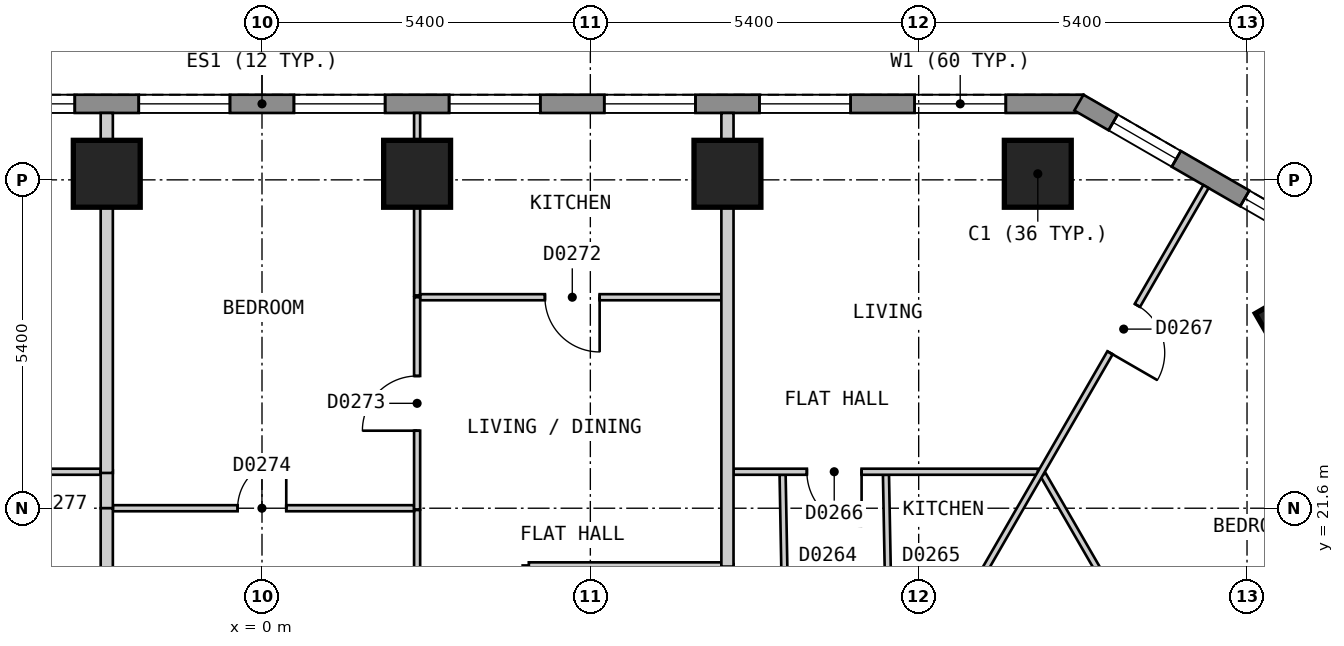
"""IFC4 building model, lengths in metres.
Left out: names, types, materials, properties, quantities, classifications, styles, units other than length and angle.
Written with IfcOpenShell. Run it as: python <this file> out.ifc"""

import sys

from ifc_helpers import new_model, si_unit, direction, frame, frame_2d, origin, origin_2d, place, context, subcontext, project, spatial, polyline, rectangle, outline, extrude, element, fill, save


model = new_model("IFC4")
c1 = context("Model", 3, precision=1e-05, world=origin(), true_north=direction((0.0, 1.0)))
c2 = subcontext(c1, "Body", "Model", "MODEL_VIEW")
j1 = project(units=[si_unit("LENGTHUNIT", "METRE"), si_unit("PLANEANGLEUNIT", "RADIAN")], contexts=[c1])
p1 = place(None, origin())
s1 = spatial("IfcSite", under=j1, at=p1, CompositionType="ELEMENT")
p2 = place(p1, origin())
s2 = spatial("IfcBuilding", under=s1, at=p2, CompositionType="ELEMENT")
p3 = place(p2, frame((0.0, 0.0, 47.4)))
s3 = spatial("IfcBuildingStorey", under=s2, at=p3, CompositionType="ELEMENT", Elevation=47.4)
for number, where, z_axis, x_axis in (
    (1, (12.759, 27.1, 0.0), (0.0, 0.0, 1.0), (-1.0, 0.0, 0.0)),
    (2, (7.655, 27.1, 0.0), (0.0, 0.0, 1.0), (-1.0, 0.0, 0.0)),
    (3, (2.551, 27.1, 0.0), (0.0, 0.0, 1.0), (-1.0, 0.0, 0.0)),
    (4, (-2.553, 27.1, 0.0), (0.0, 0.0, 1.0), (-1.0, 0.0, 0.0)),
    (5, (17.089, 24.601, 0.0), (0.0, 0.0, 1.0), (-0.5, 0.866, 0.0)),
):
    element("IfcColumn", number, at=place(p3, frame(where, z_axis=z_axis, x_axis=x_axis)), inside=s3, PredefinedType="COLUMN", context=c2, shape_type="SweptSolid", body=[
        extrude(rectangle(XDim=1.1, YDim=1.1, at=origin_2d()), origin(), (0.0, 0.0, 1.0), 3.0),
    ])
p4 = place(p3, frame((13.51, 28.25, 0.0), z_axis=(0.0, 0.0, 1.0), x_axis=(-1.0, 0.0, 0.0)))
e6 = element("IfcWall", 6, at=p4, inside=s3, PredefinedType="SOLIDWALL", context=c2, shape_type="SweptSolid", body=[
    extrude(outline(polyline([(0.0, -0.15), (27.02, -0.15), (26.94, 0.15), (0.08, 0.15), (0.0, -0.15)])), origin(), (0.0, 0.0, 1.0), 2.7),
])
p5 = place(p4, frame((1.277, 0.0, 0.15)))
e7 = element("IfcOpeningElement", 7, at=p5, cuts=e6, PredefinedType="OPENING", context=c2, shape_type="SweptSolid", body=[
    extrude(rectangle(XDim=1.5, YDim=2.1, at=frame_2d((0.75, 1.05))), frame((0.0, 0.16, 0.0), z_axis=(0.0, -1.0, 0.0), x_axis=(1.0, 0.0, 0.0)), (0.0, 0.0, 1.0), 0.32),
])
p6 = place(p4, frame((3.829, 0.0, 0.15)))
e8 = element("IfcOpeningElement", 8, at=p6, cuts=e6, PredefinedType="OPENING", context=c2, shape_type="SweptSolid", body=[
    extrude(rectangle(XDim=1.5, YDim=2.1, at=frame_2d((0.75, 1.05))), frame((0.0, 0.16, 0.0), z_axis=(0.0, -1.0, 0.0), x_axis=(1.0, 0.0, 0.0)), (0.0, 0.0, 1.0), 0.32),
])
p7 = place(p4, frame((6.381, 0.0, 0.15)))
e9 = element("IfcOpeningElement", 9, at=p7, cuts=e6, PredefinedType="OPENING", context=c2, shape_type="SweptSolid", body=[
    extrude(rectangle(XDim=1.5, YDim=2.1, at=frame_2d((0.75, 1.05))), frame((0.0, 0.16, 0.0), z_axis=(0.0, -1.0, 0.0), x_axis=(1.0, 0.0, 0.0)), (0.0, 0.0, 1.0), 0.32),
])
p8 = place(p4, frame((8.933, 0.0, 0.15)))
e10 = element("IfcOpeningElement", 10, at=p8, cuts=e6, PredefinedType="OPENING", context=c2, shape_type="SweptSolid", body=[
    extrude(rectangle(XDim=1.5, YDim=2.1, at=frame_2d((0.75, 1.05))), frame((0.0, 0.16, 0.0), z_axis=(0.0, -1.0, 0.0), x_axis=(1.0, 0.0, 0.0)), (0.0, 0.0, 1.0), 0.32),
])
p9 = place(p4, frame((11.485, 0.0, 0.15)))
e11 = element("IfcOpeningElement", 11, at=p9, cuts=e6, PredefinedType="OPENING", context=c2, shape_type="SweptSolid", body=[
    extrude(rectangle(XDim=1.5, YDim=2.1, at=frame_2d((0.75, 1.05))), frame((0.0, 0.16, 0.0), z_axis=(0.0, -1.0, 0.0), x_axis=(1.0, 0.0, 0.0)), (0.0, 0.0, 1.0), 0.32),
])
p10 = place(p4, frame((14.037, 0.0, 0.15)))
e12 = element("IfcOpeningElement", 12, at=p10, cuts=e6, PredefinedType="OPENING", context=c2, shape_type="SweptSolid", body=[
    extrude(rectangle(XDim=1.5, YDim=2.1, at=frame_2d((0.75, 1.05))), frame((0.0, 0.16, 0.0), z_axis=(0.0, -1.0, 0.0), x_axis=(1.0, 0.0, 0.0)), (0.0, 0.0, 1.0), 0.32),
])
p11 = place(p4, frame((16.589, 0.0, 0.15)))
e13 = element("IfcOpeningElement", 13, at=p11, cuts=e6, PredefinedType="OPENING", context=c2, shape_type="SweptSolid", body=[
    extrude(rectangle(XDim=1.5, YDim=2.1, at=frame_2d((0.75, 1.05))), frame((0.0, 0.16, 0.0), z_axis=(0.0, -1.0, 0.0), x_axis=(1.0, 0.0, 0.0)), (0.0, 0.0, 1.0), 0.32),
])
p12 = place(p4, frame((19.141, 0.0, 0.15)))
e14 = element("IfcOpeningElement", 14, at=p12, cuts=e6, PredefinedType="OPENING", context=c2, shape_type="SweptSolid", body=[
    extrude(rectangle(XDim=1.5, YDim=2.1, at=frame_2d((0.75, 1.05))), frame((0.0, 0.16, 0.0), z_axis=(0.0, -1.0, 0.0), x_axis=(1.0, 0.0, 0.0)), (0.0, 0.0, 1.0), 0.32),
])
p13 = place(p4, frame((21.693, 0.0, 0.15)))
e15 = element("IfcOpeningElement", 15, at=p13, cuts=e6, PredefinedType="OPENING", context=c2, shape_type="SweptSolid", body=[
    extrude(rectangle(XDim=1.5, YDim=2.1, at=frame_2d((0.75, 1.05))), frame((0.0, 0.16, 0.0), z_axis=(0.0, -1.0, 0.0), x_axis=(1.0, 0.0, 0.0)), (0.0, 0.0, 1.0), 0.32),
])
p14 = place(p4, frame((24.245, 0.0, 0.15)))
e16 = element("IfcOpeningElement", 16, at=p14, cuts=e6, PredefinedType="OPENING", context=c2, shape_type="SweptSolid", body=[
    extrude(rectangle(XDim=1.5, YDim=2.1, at=frame_2d((0.75, 1.05))), frame((0.0, 0.16, 0.0), z_axis=(0.0, -1.0, 0.0), x_axis=(1.0, 0.0, 0.0)), (0.0, 0.0, 1.0), 0.32),
])
p15 = place(p3, frame((17.765, 25.77, 0.0), z_axis=(0.0, 0.0, 1.0), x_axis=(-0.866010750942, 0.50002537861, 0.0)))
e17 = element("IfcWall", 17, at=p15, inside=s3, PredefinedType="SOLIDWALL", context=c2, shape_type="SweptSolid", body=[
    extrude(outline(polyline([(0.0, -0.15), (5.0, -0.15), (4.919, 0.15), (0.08, 0.15), (0.0, -0.15)])), origin(), (0.0, 0.0, 1.0), 2.7),
])
p16 = place(p15, frame((0.65, 0.0, 0.15)))
e18 = element("IfcOpeningElement", 18, at=p16, cuts=e17, PredefinedType="OPENING", context=c2, shape_type="SweptSolid", body=[
    extrude(rectangle(XDim=1.2, YDim=2.1, at=frame_2d((0.6, 1.05))), frame((0.0, 0.16, 0.0), z_axis=(0.0, -1.0, 0.0), x_axis=(1.0, 0.0, 0.0)), (0.0, 0.0, 1.0), 0.32),
])
p17 = place(p15, frame((3.15, 0.0, 0.15)))
e19 = element("IfcOpeningElement", 19, at=p17, cuts=e17, PredefinedType="OPENING", context=c2, shape_type="SweptSolid", body=[
    extrude(rectangle(XDim=1.2, YDim=2.1, at=frame_2d((0.6, 1.05))), frame((0.0, 0.16, 0.0), z_axis=(0.0, -1.0, 0.0), x_axis=(1.0, 0.0, 0.0)), (0.0, 0.0, 1.0), 0.32),
])
p18 = place(p3, frame((12.846, 22.15, 0.0), z_axis=(0.0, 0.0, 1.0), x_axis=(0.500002715276, -0.866023836113, 0.0)))
e20 = element("IfcWall", 20, at=p18, inside=s3, PredefinedType="PARTITIONING", context=c2, shape_type="SweptSolid", body=[
    extrude(rectangle(XDim=5.002, YDim=0.1, at=frame_2d((2.501, 0.0))), origin(), (0.0, 0.0, 1.0), 2.7),
])
p19 = place(p18, frame((2.122, 0.0, 0.0)))
e21 = element("IfcOpeningElement", 21, at=p19, cuts=e20, PredefinedType="OPENING", context=c2, shape_type="SweptSolid", body=[
    extrude(rectangle(XDim=0.8, YDim=2.1, at=frame_2d((0.4, 1.05))), frame((0.0, 0.06, 0.0), z_axis=(0.0, -1.0, 0.0), x_axis=(1.0, 0.0, 0.0)), (0.0, 0.0, 1.0), 0.12),
])
p20 = place(p3, frame((8.562, 22.15, 0.0), z_axis=(0.0, 0.0, 1.0), x_axis=(0.018504185939, -0.999828782894, 0.0)))
e22 = element("IfcWall", 22, at=p20, inside=s3, PredefinedType="PARTITIONING", context=c2, shape_type="SweptSolid", body=[
    extrude(rectangle(XDim=4.051, YDim=0.1, at=frame_2d((2.025, 0.0))), origin(), (0.0, 0.0, 1.0), 2.7),
])
p21 = place(p20, frame((1.65, 0.0, 0.0)))
e23 = element("IfcOpeningElement", 23, at=p21, cuts=e22, PredefinedType="OPENING", context=c2, shape_type="SweptSolid", body=[
    extrude(rectangle(XDim=0.8, YDim=2.1, at=frame_2d((0.4, 1.05))), frame((0.0, 0.06, 0.0), z_axis=(0.0, -1.0, 0.0), x_axis=(1.0, 0.0, 0.0)), (0.0, 0.0, 1.0), 0.12),
])
p22 = place(p3, frame((10.262, 22.15, 0.0), z_axis=(0.0, 0.0, 1.0), x_axis=(0.018730524712, -0.999824568334, 0.0)))
e24 = element("IfcWall", 24, at=p22, inside=s3, PredefinedType="PARTITIONING", context=c2, shape_type="SweptSolid", body=[
    extrude(rectangle(XDim=4.054, YDim=0.1, at=frame_2d((2.027, 0.0))), origin(), (0.0, 0.0, 1.0), 2.7),
])
p23 = place(p22, frame((1.6, 0.0, 0.0)))
e25 = element("IfcOpeningElement", 25, at=p23, cuts=e24, PredefinedType="OPENING", context=c2, shape_type="SweptSolid", body=[
    extrude(rectangle(XDim=0.9, YDim=2.1, at=frame_2d((0.45, 1.05))), frame((0.0, 0.06, 0.0), z_axis=(0.0, -1.0, 0.0), x_axis=(1.0, 0.0, 0.0)), (0.0, 0.0, 1.0), 0.12),
])
p24 = place(p3, frame((2.551, 28.1, 0.0), z_axis=(0.0, 0.0, 1.0), x_axis=(0.0, -1.0, 0.0)))
e26 = element("IfcWall", 26, at=p24, inside=s3, PredefinedType="PARTITIONING", context=c2, shape_type="SweptSolid", body=[
    extrude(rectangle(XDim=3.0, YDim=0.1, at=frame_2d((1.5, 0.0))), origin(), (0.0, 0.0, 1.0), 2.7),
])
p25 = place(p3, frame((2.551, 21.57, 0.0), z_axis=(0.0, 0.0, 1.0), x_axis=(0.0, -1.0, 0.0)))
e27 = element("IfcWall", 27, at=p25, inside=s3, PredefinedType="PARTITIONING", context=c2, shape_type="SweptSolid", body=[
    extrude(rectangle(XDim=3.47, YDim=0.1, at=frame_2d((1.735, 0.0))), origin(), (0.0, 0.0, 1.0), 2.7),
])
p26 = place(p3, frame((4.388, 20.66, 0.0), z_axis=(0.0, 0.0, 1.0), x_axis=(1.0, 0.0, 0.0)))
e28 = element("IfcWall", 28, at=p26, inside=s3, PredefinedType="PARTITIONING", context=c2, shape_type="SweptSolid", body=[
    extrude(rectangle(XDim=3.167, YDim=0.1, at=frame_2d((1.583, 0.0))), origin(), (0.0, 0.0, 1.0), 2.7),
])
p27 = place(p3, frame((-2.453, 21.6, 0.0), z_axis=(0.0, 0.0, 1.0), x_axis=(1.0, 0.0, 0.0)))
e29 = element("IfcWall", 29, at=p27, inside=s3, PredefinedType="PARTITIONING", context=c2, shape_type="SweptSolid", body=[
    extrude(rectangle(XDim=4.954, YDim=0.1, at=frame_2d((2.477, 0.0))), origin(), (0.0, 0.0, 1.0), 2.7),
])
p28 = place(p27, frame((2.052, 0.0, 0.0)))
e30 = element("IfcOpeningElement", 30, at=p28, cuts=e29, PredefinedType="OPENING", context=c2, shape_type="SweptSolid", body=[
    extrude(rectangle(XDim=0.8, YDim=2.1, at=frame_2d((0.4, 1.05))), frame((0.0, 0.06, 0.0), z_axis=(0.0, -1.0, 0.0), x_axis=(1.0, 0.0, 0.0)), (0.0, 0.0, 1.0), 0.12),
])
p29 = place(p3, frame((-12.711, 22.2, 0.0), z_axis=(0.0, 0.0, 1.0), x_axis=(1.0, 0.0, 0.0)))
e31 = element("IfcWall", 31, at=p29, inside=s3, PredefinedType="PARTITIONING", context=c2, shape_type="SweptSolid", body=[
    extrude(rectangle(XDim=10.058, YDim=0.1, at=frame_2d((5.029, 0.0))), origin(), (0.0, 0.0, 1.0), 2.7),
])
p30 = place(p29, frame((7.156, 0.0, 0.0)))
e32 = element("IfcOpeningElement", 32, at=p30, cuts=e31, PredefinedType="OPENING", context=c2, shape_type="SweptSolid", body=[
    extrude(rectangle(XDim=0.9, YDim=2.1, at=frame_2d((0.45, 1.05))), frame((0.0, 0.06, 0.0), z_axis=(0.0, -1.0, 0.0), x_axis=(1.0, 0.0, 0.0)), (0.0, 0.0, 1.0), 0.12),
])
p31 = place(p29, frame((2.102, 0.0, 0.0)))
e33 = element("IfcOpeningElement", 33, at=p31, cuts=e31, PredefinedType="OPENING", context=c2, shape_type="SweptSolid", body=[
    extrude(rectangle(XDim=0.8, YDim=2.1, at=frame_2d((0.4, 1.05))), frame((0.0, 0.06, 0.0), z_axis=(0.0, -1.0, 0.0), x_axis=(1.0, 0.0, 0.0)), (0.0, 0.0, 1.0), 0.12),
])
p32 = place(p3, frame((7.755, 22.2, 0.0), z_axis=(0.0, 0.0, 1.0), x_axis=(1.0, 0.0, 0.0)))
e34 = element("IfcWall", 34, at=p32, inside=s3, PredefinedType="PARTITIONING", context=c2, shape_type="SweptSolid", body=[
    extrude(rectangle(XDim=5.005, YDim=0.1, at=frame_2d((2.502, 0.0))), origin(), (0.0, 0.0, 1.0), 2.7),
])
p33 = place(p32, frame((1.206, 0.0, 0.0)))
e35 = element("IfcOpeningElement", 35, at=p33, cuts=e34, PredefinedType="OPENING", context=c2, shape_type="SweptSolid", body=[
    extrude(rectangle(XDim=0.9, YDim=2.1, at=frame_2d((0.45, 1.05))), frame((0.0, 0.06, 0.0), z_axis=(0.0, -1.0, 0.0), x_axis=(1.0, 0.0, 0.0)), (0.0, 0.0, 1.0), 0.12),
])
p34 = place(p3, frame((2.601, 25.07, 0.0), z_axis=(0.0, 0.0, 1.0), x_axis=(1.0, 0.0, 0.0)))
e36 = element("IfcWall", 36, at=p34, inside=s3, PredefinedType="PARTITIONING", context=c2, shape_type="SweptSolid", body=[
    extrude(rectangle(XDim=4.954, YDim=0.1, at=frame_2d((2.477, 0.0))), origin(), (0.0, 0.0, 1.0), 2.7),
])
p35 = place(p34, frame((2.052, 0.0, 0.0)))
e37 = element("IfcOpeningElement", 37, at=p35, cuts=e36, PredefinedType="OPENING", context=c2, shape_type="SweptSolid", body=[
    extrude(rectangle(XDim=0.9, YDim=2.1, at=frame_2d((0.45, 1.05))), frame((0.0, 0.06, 0.0), z_axis=(0.0, -1.0, 0.0), x_axis=(1.0, 0.0, 0.0)), (0.0, 0.0, 1.0), 0.12),
])
p36 = place(p3, frame((10.393, 18.0, 0.0), z_axis=(0.0, 0.0, 1.0), x_axis=(0.499945497007, 0.866056868816, 0.0)))
e38 = element("IfcWall", 38, at=p36, inside=s3, PredefinedType="PARTITIONING", context=c2, shape_type="SweptSolid", body=[
    extrude(rectangle(XDim=10.265, YDim=0.1, at=frame_2d((5.132, 0.0))), origin(), (0.0, 0.0, 1.0), 2.7),
])
p37 = place(p36, frame((7.108, 0.0, 0.0)))
e39 = element("IfcOpeningElement", 39, at=p37, cuts=e38, PredefinedType="OPENING", context=c2, shape_type="SweptSolid", body=[
    extrude(rectangle(XDim=0.9, YDim=2.1, at=frame_2d((0.45, 1.05))), frame((0.0, 0.06, 0.0), z_axis=(0.0, -1.0, 0.0), x_axis=(1.0, 0.0, 0.0)), (0.0, 0.0, 1.0), 0.12),
])
p38 = place(p3, frame((4.337, 18.1, 0.0), z_axis=(0.0, 0.0, 1.0), x_axis=(0.0, 1.0, 0.0)))
e40 = element("IfcWall", 40, at=p38, inside=s3, PredefinedType="PARTITIONING", context=c2, shape_type="SweptSolid", body=[
    extrude(rectangle(XDim=2.559, YDim=0.1, at=frame_2d((1.279, 0.0))), origin(), (0.0, 0.0, 1.0), 2.7),
])
p39 = place(p38, frame((0.78, 0.0, 0.0)))
e41 = element("IfcOpeningElement", 41, at=p39, cuts=e40, PredefinedType="OPENING", context=c2, shape_type="SweptSolid", body=[
    extrude(rectangle(XDim=0.9, YDim=2.1, at=frame_2d((0.45, 1.05))), frame((0.0, 0.06, 0.0), z_axis=(0.0, -1.0, 0.0), x_axis=(1.0, 0.0, 0.0)), (0.0, 0.0, 1.0), 0.12),
])
p40 = place(p3, frame((2.551, 21.58, 0.0), z_axis=(0.0, 0.0, 1.0), x_axis=(0.0, 1.0, 0.0)))
e42 = element("IfcWall", 42, at=p40, inside=s3, PredefinedType="PARTITIONING", context=c2, shape_type="SweptSolid", body=[
    extrude(rectangle(XDim=3.49, YDim=0.1, at=frame_2d((1.745, 0.0))), origin(), (0.0, 0.0, 1.0), 2.7),
])
p41 = place(p40, frame((1.295, 0.0, 0.0)))
e43 = element("IfcOpeningElement", 43, at=p41, cuts=e42, PredefinedType="OPENING", context=c2, shape_type="SweptSolid", body=[
    extrude(rectangle(XDim=0.9, YDim=2.1, at=frame_2d((0.45, 1.05))), frame((0.0, 0.06, 0.0), z_axis=(0.0, -1.0, 0.0), x_axis=(1.0, 0.0, 0.0)), (0.0, 0.0, 1.0), 0.12),
])
p42 = place(p3, frame((-2.553, 22.22, 0.0), z_axis=(0.0, 0.0, 1.0), x_axis=(0.0, -1.0, 0.0)))
e44 = element("IfcWall", 44, at=p42, inside=s3, PredefinedType="PARTITIONING", context=c2, shape_type="SweptSolid", body=[
    extrude(rectangle(XDim=0.62, YDim=0.2, at=frame_2d((0.31, 0.0))), origin(), (0.0, 0.0, 1.0), 2.7),
])
p43 = place(p3, frame((7.655, 20.68, 0.0), z_axis=(0.0, 0.0, 1.0), x_axis=(0.0, -1.0, 0.0)))
e45 = element("IfcWall", 45, at=p43, inside=s3, PredefinedType="PARTITIONING", context=c2, shape_type="SweptSolid", body=[
    extrude(rectangle(XDim=2.58, YDim=0.2, at=frame_2d((1.29, 0.0))), origin(), (0.0, 0.0, 1.0), 2.7),
])
p44 = place(p3, frame((7.655, 20.64, 0.0), z_axis=(0.0, 0.0, 1.0), x_axis=(0.0, 1.0, 0.0)))
e46 = element("IfcWall", 46, at=p44, inside=s3, PredefinedType="PARTITIONING", context=c2, shape_type="SweptSolid", body=[
    extrude(rectangle(XDim=7.46, YDim=0.2, at=frame_2d((3.73, 0.0))), origin(), (0.0, 0.0, 1.0), 2.7),
])
p45 = place(p3, frame((-2.553, 18.1, 0.0), z_axis=(0.0, 0.0, 1.0), x_axis=(0.0, 1.0, 0.0)))
e47 = element("IfcWall", 47, at=p45, inside=s3, PredefinedType="PARTITIONING", context=c2, shape_type="SweptSolid", body=[
    extrude(rectangle(XDim=3.5, YDim=0.2, at=frame_2d((1.75, 0.0))), origin(), (0.0, 0.0, 1.0), 2.7),
])
p46 = place(p3, frame((-2.553, 22.18, 0.0), z_axis=(0.0, 0.0, 1.0), x_axis=(0.0, 1.0, 0.0)))
e48 = element("IfcWall", 48, at=p46, inside=s3, PredefinedType="PARTITIONING", context=c2, shape_type="SweptSolid", body=[
    extrude(rectangle(XDim=5.92, YDim=0.2, at=frame_2d((2.96, 0.0))), origin(), (0.0, 0.0, 1.0), 2.7),
])
p47 = place(p3, frame((11.847, 15.681, 0.0), z_axis=(0.0, 0.0, 1.0), x_axis=(0.866022959057, 0.500004234368, 0.0)))
e49 = element("IfcWall", 49, at=p47, inside=s3, PredefinedType="PARTITIONING", context=c2, shape_type="SweptSolid", body=[
    extrude(rectangle(XDim=10.0, YDim=0.2, at=frame_2d((5.0, 0.0))), origin(), (0.0, 0.0, 1.0), 2.7),
])
p48 = place(p5, origin())
e50 = element("IfcWindow", 50, at=p48, inside=s3, PartitioningType="SINGLE_PANEL", PredefinedType="WINDOW", context=c2, shape_type="SweptSolid", body=[
    extrude(rectangle(XDim=1.5, YDim=2.1, at=frame_2d((0.75, 1.05))), frame((0.0, 0.03, 0.0), z_axis=(0.0, -1.0, 0.0), x_axis=(1.0, 0.0, 0.0)), (0.0, 0.0, 1.0), 0.06),
])
fill(e7, e50)
p49 = place(p6, origin())
e51 = element("IfcWindow", 51, at=p49, inside=s3, PartitioningType="SINGLE_PANEL", PredefinedType="WINDOW", context=c2, shape_type="SweptSolid", body=[
    extrude(rectangle(XDim=1.5, YDim=2.1, at=frame_2d((0.75, 1.05))), frame((0.0, 0.03, 0.0), z_axis=(0.0, -1.0, 0.0), x_axis=(1.0, 0.0, 0.0)), (0.0, 0.0, 1.0), 0.06),
])
fill(e8, e51)
p50 = place(p7, origin())
e52 = element("IfcWindow", 52, at=p50, inside=s3, PartitioningType="SINGLE_PANEL", PredefinedType="WINDOW", context=c2, shape_type="SweptSolid", body=[
    extrude(rectangle(XDim=1.5, YDim=2.1, at=frame_2d((0.75, 1.05))), frame((0.0, 0.03, 0.0), z_axis=(0.0, -1.0, 0.0), x_axis=(1.0, 0.0, 0.0)), (0.0, 0.0, 1.0), 0.06),
])
fill(e9, e52)
p51 = place(p8, origin())
e53 = element("IfcWindow", 53, at=p51, inside=s3, PartitioningType="SINGLE_PANEL", PredefinedType="WINDOW", context=c2, shape_type="SweptSolid", body=[
    extrude(rectangle(XDim=1.5, YDim=2.1, at=frame_2d((0.75, 1.05))), frame((0.0, 0.03, 0.0), z_axis=(0.0, -1.0, 0.0), x_axis=(1.0, 0.0, 0.0)), (0.0, 0.0, 1.0), 0.06),
])
fill(e10, e53)
p52 = place(p9, origin())
e54 = element("IfcWindow", 54, at=p52, inside=s3, PartitioningType="SINGLE_PANEL", PredefinedType="WINDOW", context=c2, shape_type="SweptSolid", body=[
    extrude(rectangle(XDim=1.5, YDim=2.1, at=frame_2d((0.75, 1.05))), frame((0.0, 0.03, 0.0), z_axis=(0.0, -1.0, 0.0), x_axis=(1.0, 0.0, 0.0)), (0.0, 0.0, 1.0), 0.06),
])
fill(e11, e54)
p53 = place(p10, origin())
e55 = element("IfcWindow", 55, at=p53, inside=s3, PartitioningType="SINGLE_PANEL", PredefinedType="WINDOW", context=c2, shape_type="SweptSolid", body=[
    extrude(rectangle(XDim=1.5, YDim=2.1, at=frame_2d((0.75, 1.05))), frame((0.0, 0.03, 0.0), z_axis=(0.0, -1.0, 0.0), x_axis=(1.0, 0.0, 0.0)), (0.0, 0.0, 1.0), 0.06),
])
fill(e12, e55)
p54 = place(p11, origin())
e56 = element("IfcWindow", 56, at=p54, inside=s3, PartitioningType="SINGLE_PANEL", PredefinedType="WINDOW", context=c2, shape_type="SweptSolid", body=[
    extrude(rectangle(XDim=1.5, YDim=2.1, at=frame_2d((0.75, 1.05))), frame((0.0, 0.03, 0.0), z_axis=(0.0, -1.0, 0.0), x_axis=(1.0, 0.0, 0.0)), (0.0, 0.0, 1.0), 0.06),
])
fill(e13, e56)
p55 = place(p16, origin())
e57 = element("IfcWindow", 57, at=p55, inside=s3, PartitioningType="SINGLE_PANEL", PredefinedType="WINDOW", context=c2, shape_type="SweptSolid", body=[
    extrude(rectangle(XDim=1.2, YDim=2.1, at=frame_2d((0.6, 1.05))), frame((0.0, 0.03, 0.0), z_axis=(0.0, -1.0, 0.0), x_axis=(1.0, 0.0, 0.0)), (0.0, 0.0, 1.0), 0.06),
])
fill(e18, e57)
p56 = place(p17, origin())
e58 = element("IfcWindow", 58, at=p56, inside=s3, PartitioningType="SINGLE_PANEL", PredefinedType="WINDOW", context=c2, shape_type="SweptSolid", body=[
    extrude(rectangle(XDim=1.2, YDim=2.1, at=frame_2d((0.6, 1.05))), frame((0.0, 0.03, 0.0), z_axis=(0.0, -1.0, 0.0), x_axis=(1.0, 0.0, 0.0)), (0.0, 0.0, 1.0), 0.06),
])
fill(e19, e58)
p57 = place(p33, origin())
e59 = element("IfcDoor", 59, at=p57, inside=s3, OperationType="SINGLE_SWING_RIGHT", PredefinedType="DOOR", context=c2, shape_type="SweptSolid", body=[
    extrude(rectangle(XDim=0.9, YDim=2.1, at=frame_2d((0.45, 1.05))), frame((0.0, 0.025, 0.0), z_axis=(0.0, -1.0, 0.0), x_axis=(1.0, 0.0, 0.0)), (0.0, 0.0, 1.0), 0.05),
])
fill(e35, e59)
p58 = place(p37, origin())
e60 = element("IfcDoor", 60, at=p58, inside=s3, OperationType="SINGLE_SWING_LEFT", PredefinedType="DOOR", context=c2, shape_type="SweptSolid", body=[
    extrude(rectangle(XDim=0.9, YDim=2.1, at=frame_2d((0.45, 1.05))), frame((0.0, 0.025, 0.0), z_axis=(0.0, -1.0, 0.0), x_axis=(1.0, 0.0, 0.0)), (0.0, 0.0, 1.0), 0.05),
])
fill(e39, e60)
p59 = place(p35, origin())
e61 = element("IfcDoor", 61, at=p59, inside=s3, OperationType="SINGLE_SWING_RIGHT", PredefinedType="DOOR", context=c2, shape_type="SweptSolid", body=[
    extrude(rectangle(XDim=0.9, YDim=2.1, at=frame_2d((0.45, 1.05))), frame((0.0, 0.025, 0.0), z_axis=(0.0, -1.0, 0.0), x_axis=(1.0, 0.0, 0.0)), (0.0, 0.0, 1.0), 0.05),
])
fill(e37, e61)
p60 = place(p41, origin())
e62 = element("IfcDoor", 62, at=p60, inside=s3, OperationType="SINGLE_SWING_LEFT", PredefinedType="DOOR", context=c2, shape_type="SweptSolid", body=[
    extrude(rectangle(XDim=0.9, YDim=2.1, at=frame_2d((0.45, 1.05))), frame((0.0, 0.025, 0.0), z_axis=(0.0, -1.0, 0.0), x_axis=(1.0, 0.0, 0.0)), (0.0, 0.0, 1.0), 0.05),
])
fill(e43, e62)
p61 = place(p28, origin())
e63 = element("IfcDoor", 63, at=p61, inside=s3, OperationType="SINGLE_SWING_RIGHT", PredefinedType="DOOR", context=c2, shape_type="SweptSolid", body=[
    extrude(rectangle(XDim=0.8, YDim=2.1, at=frame_2d((0.4, 1.05))), frame((0.0, 0.025, 0.0), z_axis=(0.0, -1.0, 0.0), x_axis=(1.0, 0.0, 0.0)), (0.0, 0.0, 1.0), 0.05),
])
fill(e30, e63)
save(model, sys.argv[1])
